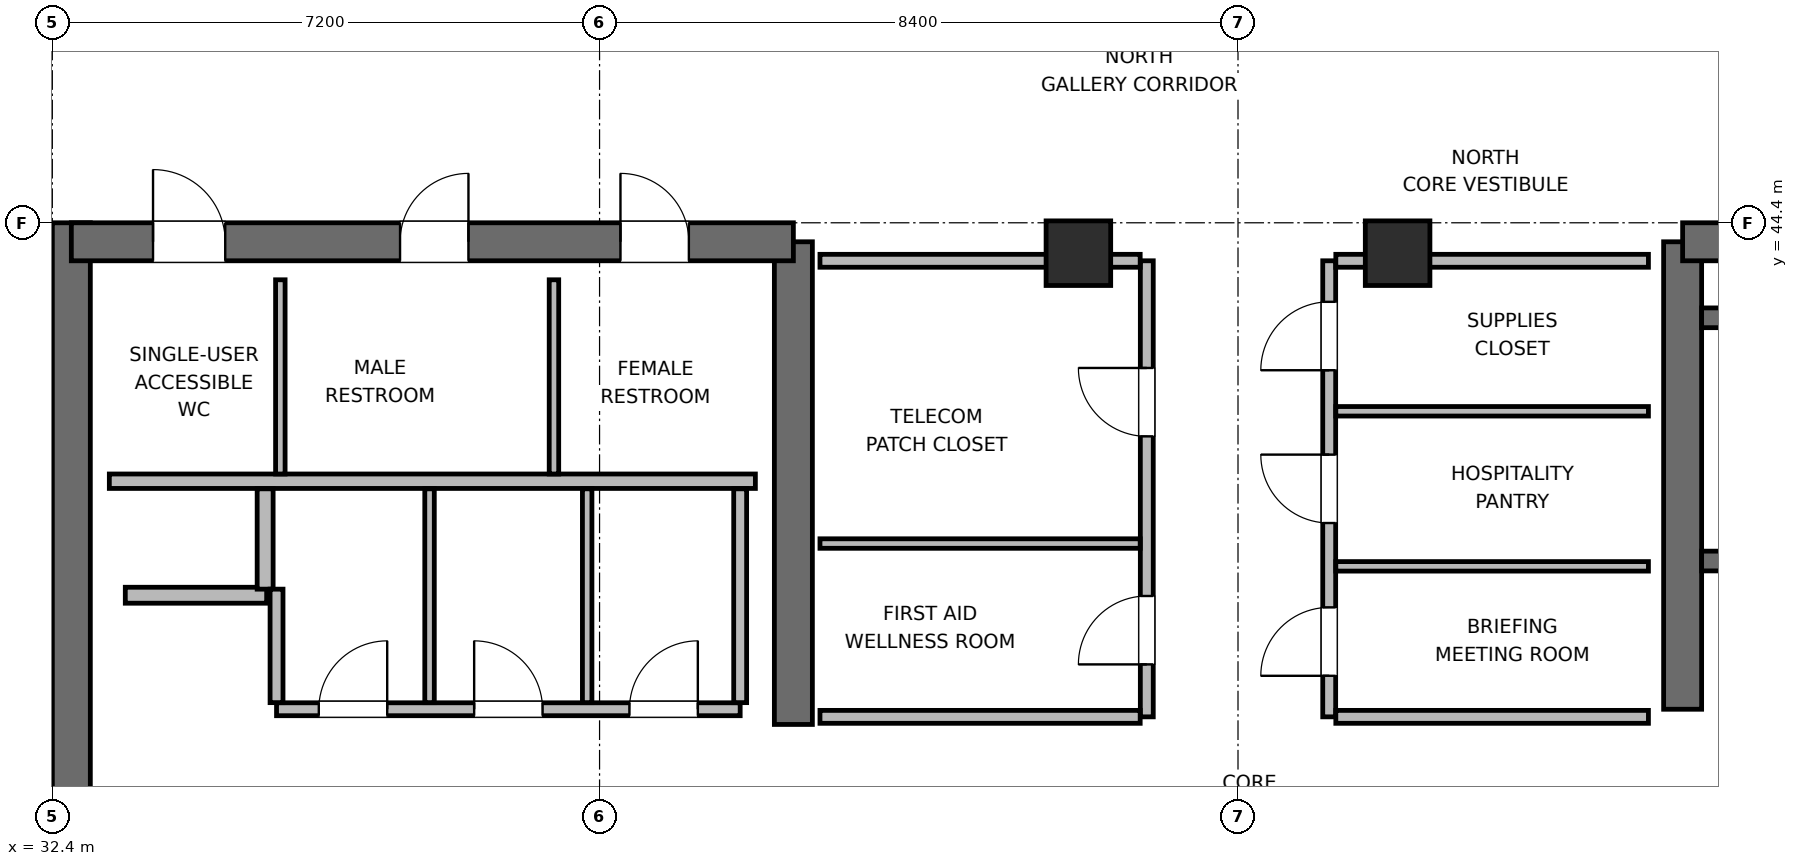
"""IFC4 building model, lengths in metres.
Left out: names, types, materials, properties, quantities, classifications, styles, units other than length and angle.
Written with IfcOpenShell. Run it as: python <this file> out.ifc"""

import sys

from ifc_helpers import new_model, si_unit, direction, frame, frame_2d, origin, origin_2d, place, context, subcontext, project, spatial, rectangle, extrude, element, fill, save


model = new_model("IFC4")
c1 = context("Model", 3, precision=1e-05, world=origin(), true_north=direction((0.0, 1.0)))
c2 = subcontext(c1, "Body", "Model", "MODEL_VIEW")
j1 = project(units=[si_unit("LENGTHUNIT", "METRE"), si_unit("PLANEANGLEUNIT", "RADIAN")], contexts=[c1])
p1 = place(None, origin())
s1 = spatial("IfcSite", under=j1, at=p1, CompositionType="ELEMENT")
p2 = place(p1, origin())
s2 = spatial("IfcBuilding", under=s1, at=p2, CompositionType="ELEMENT")
p3 = place(p2, frame((0.0, 0.0, 342.0)))
s3 = spatial("IfcBuildingStorey", under=s2, at=p3, CompositionType="ELEMENT", Elevation=342.0)
p4 = place(p3, frame((32.65, 27.6, 0.0), z_axis=(0.0, 0.0, 1.0), x_axis=(0.0, 1.0, 0.0)))
e1 = element("IfcWall", 1, at=p4, inside=s3, PredefinedType="SHEAR", context=c2, shape_type="SweptSolid", body=[
    extrude(rectangle(XDim=16.8, YDim=0.5, at=frame_2d((8.4, 0.0))), origin(), (0.0, 0.0, 1.0), 4.5),
])
p5 = place(p3, frame((42.15, 37.8, 0.0), z_axis=(0.0, 0.0, 1.0), x_axis=(0.0, 1.0, 0.0)))
e2 = element("IfcWall", 2, at=p5, inside=s3, PredefinedType="SHEAR", context=c2, shape_type="SweptSolid", body=[
    extrude(rectangle(XDim=6.35, YDim=0.5, at=frame_2d((3.175, 0.0))), origin(), (0.0, 0.0, 1.0), 4.5),
])
p6 = place(p3, frame((32.65, 44.15, 0.0), z_axis=(0.0, 0.0, 1.0), x_axis=(1.0, 0.0, 0.0)))
e3 = element("IfcWall", 3, at=p6, inside=s3, PredefinedType="SHEAR", context=c2, shape_type="SweptSolid", body=[
    extrude(rectangle(XDim=9.5, YDim=0.5, at=frame_2d((4.75, 0.0))), origin(), (0.0, 0.0, 1.0), 4.5),
])
p7 = place(p6, frame((1.075, 0.0, 0.0)))
e4 = element("IfcOpeningElement", 4, at=p7, cuts=e3, PredefinedType="OPENING", context=c2, shape_type="SweptSolid", body=[
    extrude(rectangle(XDim=0.95, YDim=2.04, at=frame_2d((0.475, 1.02))), frame((0.0, 0.26, 0.0), z_axis=(0.0, -1.0, 0.0), x_axis=(1.0, 0.0, 0.0)), (0.0, 0.0, 1.0), 0.52),
])
p8 = place(p6, frame((4.325, 0.0, 0.0)))
e5 = element("IfcOpeningElement", 5, at=p8, cuts=e3, PredefinedType="OPENING", context=c2, shape_type="SweptSolid", body=[
    extrude(rectangle(XDim=0.9, YDim=2.02, at=frame_2d((0.45, 1.01))), frame((0.0, 0.26, 0.0), z_axis=(0.0, -1.0, 0.0), x_axis=(1.0, 0.0, 0.0)), (0.0, 0.0, 1.0), 0.52),
])
p9 = place(p6, frame((7.225, 0.0, 0.0)))
e6 = element("IfcOpeningElement", 6, at=p9, cuts=e3, PredefinedType="OPENING", context=c2, shape_type="SweptSolid", body=[
    extrude(rectangle(XDim=0.9, YDim=2.02, at=frame_2d((0.45, 1.01))), frame((0.0, 0.26, 0.0), z_axis=(0.0, -1.0, 0.0), x_axis=(1.0, 0.0, 0.0)), (0.0, 0.0, 1.0), 0.52),
])
p10 = place(p3, frame((53.85, 38.0, 0.0), z_axis=(0.0, 0.0, 1.0), x_axis=(0.0, 1.0, 0.0)))
e7 = element("IfcWall", 7, at=p10, inside=s3, PredefinedType="SHEAR", context=c2, shape_type="SweptSolid", body=[
    extrude(rectangle(XDim=6.15, YDim=0.5, at=frame_2d((3.075, 0.0))), origin(), (0.0, 0.0, 1.0), 4.5),
])
p11 = place(p3, frame((53.85, 44.15, 0.0), z_axis=(0.0, 0.0, 1.0), x_axis=(1.0, 0.0, 0.0)))
e8 = element("IfcWall", 8, at=p11, inside=s3, PredefinedType="SHEAR", context=c2, shape_type="SweptSolid", body=[
    extrude(rectangle(XDim=9.5, YDim=0.5, at=frame_2d((4.75, 0.0))), origin(), (0.0, 0.0, 1.0), 4.5),
])
p12 = place(p3, frame((54.1, 39.95, 0.0), z_axis=(0.0, 0.0, 1.0), x_axis=(1.0, 0.0, 0.0)))
e9 = element("IfcWall", 9, at=p12, inside=s3, PredefinedType="SHEAR", context=c2, shape_type="SweptSolid", body=[
    extrude(rectangle(XDim=9.0, YDim=0.26, at=frame_2d((4.5, 0.0))), origin(), (0.0, 0.0, 1.0), 4.5),
])
p13 = place(p12, frame((1.1, 0.0, 0.0)))
e10 = element("IfcOpeningElement", 10, at=p13, cuts=e9, PredefinedType="OPENING", context=c2, shape_type="SweptSolid", body=[
    extrude(rectangle(XDim=1.0, YDim=2.04, at=frame_2d((0.5, 1.02))), frame((0.0, 0.14, 0.0), z_axis=(0.0, -1.0, 0.0), x_axis=(1.0, 0.0, 0.0)), (0.0, 0.0, 1.0), 0.28),
])
p14 = place(p3, frame((54.1, 43.15, 0.0), z_axis=(0.0, 0.0, 1.0), x_axis=(1.0, 0.0, 0.0)))
e11 = element("IfcWall", 11, at=p14, inside=s3, PredefinedType="SHEAR", context=c2, shape_type="SweptSolid", body=[
    extrude(rectangle(XDim=9.0, YDim=0.26, at=frame_2d((4.5, 0.0))), origin(), (0.0, 0.0, 1.0), 4.5),
])
for number, where, z_axis, x_axis in (
    (12, (45.9, 44.0, 0.0), (0.0, 0.0, 1.0), (1.0, 0.0, 0.0)),
    (13, (50.1, 44.0, 0.0), (0.0, 0.0, 1.0), (1.0, 0.0, 0.0)),
):
    element("IfcColumn", number, at=place(p3, frame(where, z_axis=z_axis, x_axis=x_axis)), inside=s3, PredefinedType="COLUMN", context=c2, shape_type="SweptSolid", body=[
        extrude(rectangle(XDim=0.85, YDim=0.85, at=origin_2d()), origin(), (0.0, 0.0, 1.0), 4.5),
    ])
p15 = place(p3, frame((33.15, 41.0, 0.0), z_axis=(0.0, 0.0, 1.0), x_axis=(1.0, 0.0, 0.0)))
e14 = element("IfcWall", 14, at=p15, inside=s3, PredefinedType="PLUMBINGWALL", context=c2, shape_type="SweptSolid", body=[
    extrude(rectangle(XDim=8.5, YDim=0.19, at=frame_2d((4.25, 0.0))), origin(), (0.0, 0.0, 1.0), 4.28),
])
for number, where, z_axis, x_axis in (
    (15, (35.4, 41.095, 0.0), (0.0, 0.0, 1.0), (0.0, 1.0, 0.0)),
    (16, (39.0, 41.095, 0.0), (0.0, 0.0, 1.0), (0.0, 1.0, 0.0)),
):
    element("IfcWall", number, at=place(p3, frame(where, z_axis=z_axis, x_axis=x_axis)), inside=s3, PredefinedType="PARTITIONING", context=c2, shape_type="SweptSolid", body=[
        extrude(rectangle(XDim=2.555, YDim=0.125, at=frame_2d((1.277, 0.0))), origin(), (0.0, 0.0, 1.0), 4.28),
    ])
p16 = place(p3, frame((33.36, 39.5, 0.0), z_axis=(0.0, 0.0, 1.0), x_axis=(1.0, 0.0, 0.0)))
e17 = element("IfcWall", 17, at=p16, inside=s3, PredefinedType="PARTITIONING", context=c2, shape_type="SweptSolid", body=[
    extrude(rectangle(XDim=1.86, YDim=0.21, at=frame_2d((0.93, 0.0))), origin(), (0.0, 0.0, 1.0), 4.28),
])
p17 = place(p3, frame((35.2, 39.58, 0.0), z_axis=(0.0, 0.0, 1.0), x_axis=(0.0, 1.0, 0.0)))
e18 = element("IfcWall", 18, at=p17, inside=s3, PredefinedType="PARTITIONING", context=c2, shape_type="SweptSolid", body=[
    extrude(rectangle(XDim=1.32, YDim=0.21, at=frame_2d((0.66, 0.0))), origin(), (0.0, 0.0, 1.0), 4.28),
])
p18 = place(p3, frame((35.35, 38.0, 0.0), z_axis=(0.0, 0.0, 1.0), x_axis=(1.0, 0.0, 0.0)))
e19 = element("IfcWall", 19, at=p18, inside=s3, PredefinedType="PARTITIONING", context=c2, shape_type="SweptSolid", body=[
    extrude(rectangle(XDim=6.1, YDim=0.17, at=frame_2d((3.05, 0.0))), origin(), (0.0, 0.0, 1.0), 4.28),
])
p19 = place(p18, frame((0.556, 0.0, 0.0)))
e20 = element("IfcOpeningElement", 20, at=p19, cuts=e19, PredefinedType="OPENING", context=c2, shape_type="SweptSolid", body=[
    extrude(rectangle(XDim=0.9, YDim=2.02, at=frame_2d((0.45, 1.01))), frame((0.0, 0.095, 0.0), z_axis=(0.0, -1.0, 0.0), x_axis=(1.0, 0.0, 0.0)), (0.0, 0.0, 1.0), 0.19),
])
p20 = place(p18, frame((2.6, 0.0, 0.0)))
e21 = element("IfcOpeningElement", 21, at=p20, cuts=e19, PredefinedType="OPENING", context=c2, shape_type="SweptSolid", body=[
    extrude(rectangle(XDim=0.9, YDim=2.02, at=frame_2d((0.45, 1.01))), frame((0.0, 0.095, 0.0), z_axis=(0.0, -1.0, 0.0), x_axis=(1.0, 0.0, 0.0)), (0.0, 0.0, 1.0), 0.19),
])
p21 = place(p18, frame((4.643, 0.0, 0.0)))
e22 = element("IfcOpeningElement", 22, at=p21, cuts=e19, PredefinedType="OPENING", context=c2, shape_type="SweptSolid", body=[
    extrude(rectangle(XDim=0.9, YDim=2.02, at=frame_2d((0.45, 1.01))), frame((0.0, 0.095, 0.0), z_axis=(0.0, -1.0, 0.0), x_axis=(1.0, 0.0, 0.0)), (0.0, 0.0, 1.0), 0.19),
])
p22 = place(p3, frame((35.35, 38.087, 0.0), z_axis=(0.0, 0.0, 1.0), x_axis=(0.0, 1.0, 0.0)))
e23 = element("IfcWall", 23, at=p22, inside=s3, PredefinedType="PARTITIONING", context=c2, shape_type="SweptSolid", body=[
    extrude(rectangle(XDim=1.493, YDim=0.17, at=frame_2d((0.747, 0.0))), origin(), (0.0, 0.0, 1.0), 4.28),
])
p23 = place(p3, frame((41.45, 38.087, 0.0), z_axis=(0.0, 0.0, 1.0), x_axis=(0.0, 1.0, 0.0)))
e24 = element("IfcWall", 24, at=p23, inside=s3, PredefinedType="PARTITIONING", context=c2, shape_type="SweptSolid", body=[
    extrude(rectangle(XDim=2.813, YDim=0.17, at=frame_2d((1.406, 0.0))), origin(), (0.0, 0.0, 1.0), 4.28),
])
for number, where, z_axis, x_axis in (
    (25, (37.363, 38.087, 0.0), (0.0, 0.0, 1.0), (0.0, 1.0, 0.0)),
    (26, (39.437, 38.087, 0.0), (0.0, 0.0, 1.0), (0.0, 1.0, 0.0)),
):
    element("IfcWall", number, at=place(p3, frame(where, z_axis=z_axis, x_axis=x_axis)), inside=s3, PredefinedType="PARTITIONING", context=c2, shape_type="SweptSolid", body=[
        extrude(rectangle(XDim=2.813, YDim=0.125, at=frame_2d((1.406, 0.0))), origin(), (0.0, 0.0, 1.0), 4.28),
    ])
p24 = place(p3, frame((46.8, 37.9, 0.0), z_axis=(0.0, 0.0, 1.0), x_axis=(0.0, 1.0, 0.0)))
e27 = element("IfcWall", 27, at=p24, inside=s3, PredefinedType="PARTITIONING", context=c2, shape_type="SweptSolid", body=[
    extrude(rectangle(XDim=6.0, YDim=0.17, at=frame_2d((3.0, 0.0))), origin(), (0.0, 0.0, 1.0), 4.28),
])
p25 = place(p24, frame((0.69, 0.0, 0.0)))
e28 = element("IfcOpeningElement", 28, at=p25, cuts=e27, PredefinedType="OPENING", context=c2, shape_type="SweptSolid", body=[
    extrude(rectangle(XDim=0.9, YDim=2.02, at=frame_2d((0.45, 1.01))), frame((0.0, 0.095, 0.0), z_axis=(0.0, -1.0, 0.0), x_axis=(1.0, 0.0, 0.0)), (0.0, 0.0, 1.0), 0.19),
])
p26 = place(p24, frame((3.69, 0.0, 0.0)))
e29 = element("IfcOpeningElement", 29, at=p26, cuts=e27, PredefinedType="OPENING", context=c2, shape_type="SweptSolid", body=[
    extrude(rectangle(XDim=0.9, YDim=2.02, at=frame_2d((0.45, 1.01))), frame((0.0, 0.095, 0.0), z_axis=(0.0, -1.0, 0.0), x_axis=(1.0, 0.0, 0.0)), (0.0, 0.0, 1.0), 0.19),
])
p27 = place(p3, frame((42.5, 37.9, 0.0), z_axis=(0.0, 0.0, 1.0), x_axis=(1.0, 0.0, 0.0)))
e30 = element("IfcWall", 30, at=p27, inside=s3, PredefinedType="PARTITIONING", context=c2, shape_type="SweptSolid", body=[
    extrude(rectangle(XDim=4.213, YDim=0.17, at=frame_2d((2.106, 0.0))), origin(), (0.0, 0.0, 1.0), 4.28),
])
p28 = place(p3, frame((42.5, 43.9, 0.0), z_axis=(0.0, 0.0, 1.0), x_axis=(1.0, 0.0, 0.0)))
e31 = element("IfcWall", 31, at=p28, inside=s3, PredefinedType="PARTITIONING", context=c2, shape_type="SweptSolid", body=[
    extrude(rectangle(XDim=4.213, YDim=0.17, at=frame_2d((2.106, 0.0))), origin(), (0.0, 0.0, 1.0), 3.365),
])
p29 = place(p3, frame((42.5, 40.18, 0.0), z_axis=(0.0, 0.0, 1.0), x_axis=(1.0, 0.0, 0.0)))
e32 = element("IfcWall", 32, at=p29, inside=s3, PredefinedType="PARTITIONING", context=c2, shape_type="SweptSolid", body=[
    extrude(rectangle(XDim=4.213, YDim=0.125, at=frame_2d((2.106, 0.0))), origin(), (0.0, 0.0, 1.0), 4.28),
])
p30 = place(p3, frame((49.2, 37.9, 0.0), z_axis=(0.0, 0.0, 1.0), x_axis=(0.0, 1.0, 0.0)))
e33 = element("IfcWall", 33, at=p30, inside=s3, PredefinedType="PARTITIONING", context=c2, shape_type="SweptSolid", body=[
    extrude(rectangle(XDim=6.0, YDim=0.17, at=frame_2d((3.0, 0.0))), origin(), (0.0, 0.0, 1.0), 4.28),
])
p31 = place(p30, frame((0.54, 0.0, 0.0)))
e34 = element("IfcOpeningElement", 34, at=p31, cuts=e33, PredefinedType="OPENING", context=c2, shape_type="SweptSolid", body=[
    extrude(rectangle(XDim=0.9, YDim=2.02, at=frame_2d((0.45, 1.01))), frame((0.0, 0.095, 0.0), z_axis=(0.0, -1.0, 0.0), x_axis=(1.0, 0.0, 0.0)), (0.0, 0.0, 1.0), 0.19),
])
p32 = place(p30, frame((2.55, 0.0, 0.0)))
e35 = element("IfcOpeningElement", 35, at=p32, cuts=e33, PredefinedType="OPENING", context=c2, shape_type="SweptSolid", body=[
    extrude(rectangle(XDim=0.9, YDim=2.02, at=frame_2d((0.45, 1.01))), frame((0.0, 0.095, 0.0), z_axis=(0.0, -1.0, 0.0), x_axis=(1.0, 0.0, 0.0)), (0.0, 0.0, 1.0), 0.19),
])
p33 = place(p30, frame((4.56, 0.0, 0.0)))
e36 = element("IfcOpeningElement", 36, at=p33, cuts=e33, PredefinedType="OPENING", context=c2, shape_type="SweptSolid", body=[
    extrude(rectangle(XDim=0.9, YDim=2.02, at=frame_2d((0.45, 1.01))), frame((0.0, 0.095, 0.0), z_axis=(0.0, -1.0, 0.0), x_axis=(1.0, 0.0, 0.0)), (0.0, 0.0, 1.0), 0.19),
])
p34 = place(p3, frame((49.287, 37.9, 0.0), z_axis=(0.0, 0.0, 1.0), x_axis=(1.0, 0.0, 0.0)))
e37 = element("IfcWall", 37, at=p34, inside=s3, PredefinedType="PARTITIONING", context=c2, shape_type="SweptSolid", body=[
    extrude(rectangle(XDim=4.113, YDim=0.17, at=frame_2d((2.056, 0.0))), origin(), (0.0, 0.0, 1.0), 4.28),
])
p35 = place(p3, frame((49.287, 43.9, 0.0), z_axis=(0.0, 0.0, 1.0), x_axis=(1.0, 0.0, 0.0)))
e38 = element("IfcWall", 38, at=p35, inside=s3, PredefinedType="PARTITIONING", context=c2, shape_type="SweptSolid", body=[
    extrude(rectangle(XDim=4.113, YDim=0.17, at=frame_2d((2.056, 0.0))), origin(), (0.0, 0.0, 1.0), 3.365),
])
for number, where, z_axis, x_axis in (
    (39, (49.287, 39.88, 0.0), (0.0, 0.0, 1.0), (1.0, 0.0, 0.0)),
    (40, (49.287, 41.92, 0.0), (0.0, 0.0, 1.0), (1.0, 0.0, 0.0)),
):
    element("IfcWall", number, at=place(p3, frame(where, z_axis=z_axis, x_axis=x_axis)), inside=s3, PredefinedType="PARTITIONING", context=c2, shape_type="SweptSolid", body=[
        extrude(rectangle(XDim=4.113, YDim=0.125, at=frame_2d((2.056, 0.0))), origin(), (0.0, 0.0, 1.0), 4.28),
    ])
p36 = place(p7, origin())
e41 = element("IfcDoor", 41, at=p36, inside=s3, OperationType="SINGLE_SWING_LEFT", PredefinedType="DOOR", context=c2, shape_type="SweptSolid", body=[
    extrude(rectangle(XDim=0.95, YDim=2.04, at=frame_2d((0.475, 1.02))), frame((0.0, 0.025, 0.0), z_axis=(0.0, -1.0, 0.0), x_axis=(1.0, 0.0, 0.0)), (0.0, 0.0, 1.0), 0.05),
])
fill(e4, e41)
p37 = place(p8, origin())
e42 = element("IfcDoor", 42, at=p37, inside=s3, OperationType="SINGLE_SWING_RIGHT", PredefinedType="DOOR", context=c2, shape_type="SweptSolid", body=[
    extrude(rectangle(XDim=0.9, YDim=2.02, at=frame_2d((0.45, 1.01))), frame((0.0, 0.025, 0.0), z_axis=(0.0, -1.0, 0.0), x_axis=(1.0, 0.0, 0.0)), (0.0, 0.0, 1.0), 0.05),
])
fill(e5, e42)
p38 = place(p9, origin())
e43 = element("IfcDoor", 43, at=p38, inside=s3, OperationType="SINGLE_SWING_LEFT", PredefinedType="DOOR", context=c2, shape_type="SweptSolid", body=[
    extrude(rectangle(XDim=0.9, YDim=2.02, at=frame_2d((0.45, 1.01))), frame((0.0, 0.025, 0.0), z_axis=(0.0, -1.0, 0.0), x_axis=(1.0, 0.0, 0.0)), (0.0, 0.0, 1.0), 0.05),
])
fill(e6, e43)
p39 = place(p19, origin())
e44 = element("IfcDoor", 44, at=p39, inside=s3, OperationType="SINGLE_SWING_RIGHT", PredefinedType="DOOR", context=c2, shape_type="SweptSolid", body=[
    extrude(rectangle(XDim=0.9, YDim=2.02, at=frame_2d((0.45, 1.01))), frame((0.0, 0.025, 0.0), z_axis=(0.0, -1.0, 0.0), x_axis=(1.0, 0.0, 0.0)), (0.0, 0.0, 1.0), 0.05),
])
fill(e20, e44)
p40 = place(p20, origin())
e45 = element("IfcDoor", 45, at=p40, inside=s3, OperationType="SINGLE_SWING_LEFT", PredefinedType="DOOR", context=c2, shape_type="SweptSolid", body=[
    extrude(rectangle(XDim=0.9, YDim=2.02, at=frame_2d((0.45, 1.01))), frame((0.0, 0.025, 0.0), z_axis=(0.0, -1.0, 0.0), x_axis=(1.0, 0.0, 0.0)), (0.0, 0.0, 1.0), 0.05),
])
fill(e21, e45)
p41 = place(p21, origin())
e46 = element("IfcDoor", 46, at=p41, inside=s3, OperationType="SINGLE_SWING_RIGHT", PredefinedType="DOOR", context=c2, shape_type="SweptSolid", body=[
    extrude(rectangle(XDim=0.9, YDim=2.02, at=frame_2d((0.45, 1.01))), frame((0.0, 0.025, 0.0), z_axis=(0.0, -1.0, 0.0), x_axis=(1.0, 0.0, 0.0)), (0.0, 0.0, 1.0), 0.05),
])
fill(e22, e46)
p42 = place(p25, origin())
e47 = element("IfcDoor", 47, at=p42, inside=s3, OperationType="SINGLE_SWING_LEFT", PredefinedType="DOOR", context=c2, shape_type="SweptSolid", body=[
    extrude(rectangle(XDim=0.9, YDim=2.02, at=frame_2d((0.45, 1.01))), frame((0.0, 0.025, 0.0), z_axis=(0.0, -1.0, 0.0), x_axis=(1.0, 0.0, 0.0)), (0.0, 0.0, 1.0), 0.05),
])
fill(e28, e47)
p43 = place(p26, origin())
e48 = element("IfcDoor", 48, at=p43, inside=s3, OperationType="SINGLE_SWING_RIGHT", PredefinedType="DOOR", context=c2, shape_type="SweptSolid", body=[
    extrude(rectangle(XDim=0.9, YDim=2.02, at=frame_2d((0.45, 1.01))), frame((0.0, 0.025, 0.0), z_axis=(0.0, -1.0, 0.0), x_axis=(1.0, 0.0, 0.0)), (0.0, 0.0, 1.0), 0.05),
])
fill(e29, e48)
p44 = place(p31, origin())
e49 = element("IfcDoor", 49, at=p44, inside=s3, OperationType="SINGLE_SWING_LEFT", PredefinedType="DOOR", context=c2, shape_type="SweptSolid", body=[
    extrude(rectangle(XDim=0.9, YDim=2.02, at=frame_2d((0.45, 1.01))), frame((0.0, 0.025, 0.0), z_axis=(0.0, -1.0, 0.0), x_axis=(1.0, 0.0, 0.0)), (0.0, 0.0, 1.0), 0.05),
])
fill(e34, e49)
p45 = place(p32, origin())
e50 = element("IfcDoor", 50, at=p45, inside=s3, OperationType="SINGLE_SWING_RIGHT", PredefinedType="DOOR", context=c2, shape_type="SweptSolid", body=[
    extrude(rectangle(XDim=0.9, YDim=2.02, at=frame_2d((0.45, 1.01))), frame((0.0, 0.025, 0.0), z_axis=(0.0, -1.0, 0.0), x_axis=(1.0, 0.0, 0.0)), (0.0, 0.0, 1.0), 0.05),
])
fill(e35, e50)
p46 = place(p33, origin())
e51 = element("IfcDoor", 51, at=p46, inside=s3, OperationType="SINGLE_SWING_LEFT", PredefinedType="DOOR", context=c2, shape_type="SweptSolid", body=[
    extrude(rectangle(XDim=0.9, YDim=2.02, at=frame_2d((0.45, 1.01))), frame((0.0, 0.025, 0.0), z_axis=(0.0, -1.0, 0.0), x_axis=(1.0, 0.0, 0.0)), (0.0, 0.0, 1.0), 0.05),
])
fill(e36, e51)
save(model, sys.argv[1])
